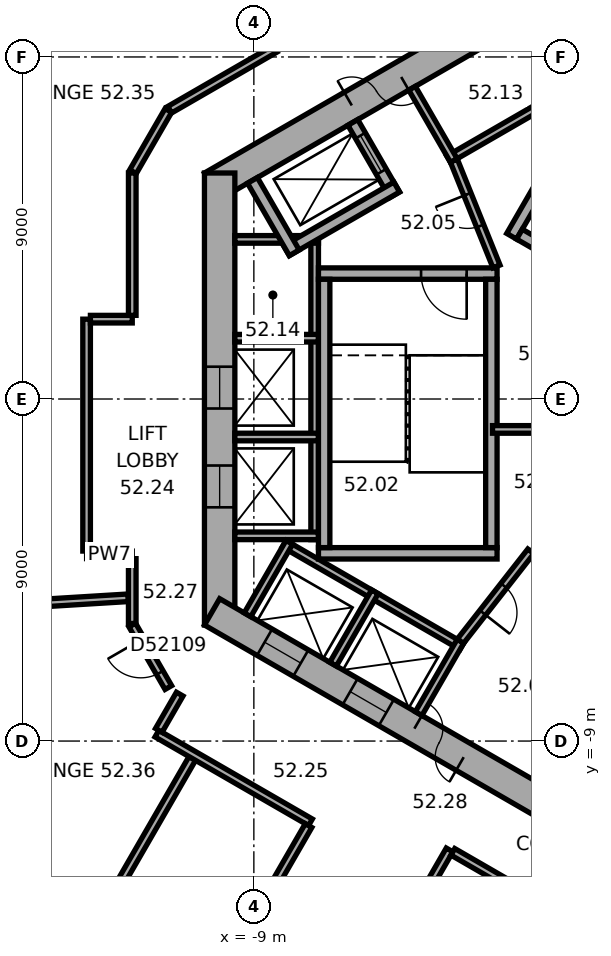
"""IFC4 building model, lengths in metres.
Left out: names, types, materials, properties, quantities, classifications, styles, units other than length and angle.
Written with IfcOpenShell. Run it as: python <this file> out.ifc"""

import sys

from ifc_helpers import new_model, si_unit, direction, frame, frame_2d, origin, place, context, subcontext, project, spatial, rectangle, extrude, element, fill, save


model = new_model("IFC4")
c1 = context("Model", 3, precision=1e-05, world=origin(), true_north=direction((0.0, 1.0)))
c2 = subcontext(c1, "Body", "Model", "MODEL_VIEW")
j1 = project(units=[si_unit("LENGTHUNIT", "METRE"), si_unit("PLANEANGLEUNIT", "RADIAN")], contexts=[c1])
p1 = place(None, origin())
s1 = spatial("IfcSite", under=j1, at=p1, CompositionType="ELEMENT")
p2 = place(p1, origin())
s2 = spatial("IfcBuilding", under=s1, at=p2, CompositionType="ELEMENT")
p3 = place(p2, frame((0.0, 0.0, 210.6)))
s3 = spatial("IfcBuildingStorey", under=s2, at=p3, CompositionType="ELEMENT", Elevation=210.6)
p4 = place(p3, frame((0.2, 11.547, 0.0), z_axis=(0.0, 0.0, 1.0), x_axis=(-0.866023897231, -0.500002609418, 0.0)))
e1 = element("IfcWall", 1, at=p4, inside=s3, PredefinedType="SHEAR", context=c2, shape_type="SweptSolid", body=[
    extrude(rectangle(XDim=11.894, YDim=0.8, at=frame_2d((5.947, 0.0))), origin(), (0.0, 0.0, 1.0), 3.7),
])
p5 = place(p4, frame((6.147, 0.0, 0.0)))
e2 = element("IfcOpeningElement", 2, at=p5, cuts=e1, PredefinedType="OPENING", context=c2, shape_type="SweptSolid", body=[
    extrude(rectangle(XDim=1.5, YDim=2.1, at=frame_2d((0.75, 1.05))), frame((0.0, 0.41, 0.0), z_axis=(0.0, -1.0, 0.0), x_axis=(1.0, 0.0, 0.0)), (0.0, 0.0, 1.0), 0.82),
])
p6 = place(p4, frame((2.997, 0.0, 0.0)))
e3 = element("IfcOpeningElement", 3, at=p6, cuts=e1, PredefinedType="OPENING", context=c2, shape_type="SweptSolid", body=[
    extrude(rectangle(XDim=0.9, YDim=2.1, at=frame_2d((0.45, 1.05))), frame((0.0, 0.41, 0.0), z_axis=(0.0, -1.0, 0.0), x_axis=(1.0, 0.0, 0.0)), (0.0, 0.0, 1.0), 0.82),
])
p7 = place(p3, frame((-9.9, 5.947, 0.0), z_axis=(0.0, 0.0, 1.0), x_axis=(0.0, -1.0, 0.0)))
e4 = element("IfcWall", 4, at=p7, inside=s3, PredefinedType="SHEAR", context=c2, shape_type="SweptSolid", body=[
    extrude(rectangle(XDim=11.894, YDim=0.8, at=frame_2d((5.947, 0.0))), origin(), (0.0, 0.0, 1.0), 3.7),
])
p8 = place(p7, frame((5.097, 0.0, 0.0)))
e5 = element("IfcOpeningElement", 5, at=p8, cuts=e4, PredefinedType="OPENING", context=c2, shape_type="SweptSolid", body=[
    extrude(rectangle(XDim=1.1, YDim=2.1, at=frame_2d((0.55, 1.05))), frame((0.0, 0.41, 0.0), z_axis=(0.0, -1.0, 0.0), x_axis=(1.0, 0.0, 0.0)), (0.0, 0.0, 1.0), 0.82),
])
p9 = place(p7, frame((7.697, 0.0, 0.0)))
e6 = element("IfcOpeningElement", 6, at=p9, cuts=e4, PredefinedType="OPENING", context=c2, shape_type="SweptSolid", body=[
    extrude(rectangle(XDim=1.1, YDim=2.1, at=frame_2d((0.55, 1.05))), frame((0.0, 0.41, 0.0), z_axis=(0.0, -1.0, 0.0), x_axis=(1.0, 0.0, 0.0)), (0.0, 0.0, 1.0), 0.82),
])
p10 = place(p3, frame((-10.1, -5.6, 0.0), z_axis=(0.0, 0.0, 1.0), x_axis=(0.866023897231, -0.500002609418, 0.0)))
e7 = element("IfcWall", 7, at=p10, inside=s3, PredefinedType="SHEAR", context=c2, shape_type="SweptSolid", body=[
    extrude(rectangle(XDim=11.894, YDim=0.8, at=frame_2d((5.947, 0.0))), origin(), (0.0, 0.0, 1.0), 3.7),
])
p11 = place(p10, frame((6.147, 0.0, 0.0)))
e8 = element("IfcOpeningElement", 8, at=p11, cuts=e7, PredefinedType="OPENING", context=c2, shape_type="SweptSolid", body=[
    extrude(rectangle(XDim=1.5, YDim=2.1, at=frame_2d((0.75, 1.05))), frame((0.0, 0.41, 0.0), z_axis=(0.0, -1.0, 0.0), x_axis=(1.0, 0.0, 0.0)), (0.0, 0.0, 1.0), 0.82),
])
p12 = place(p10, frame((1.597, 0.0, 0.0)))
e9 = element("IfcOpeningElement", 9, at=p12, cuts=e7, PredefinedType="OPENING", context=c2, shape_type="SweptSolid", body=[
    extrude(rectangle(XDim=1.1, YDim=2.1, at=frame_2d((0.55, 1.05))), frame((0.0, 0.41, 0.0), z_axis=(0.0, -1.0, 0.0), x_axis=(1.0, 0.0, 0.0)), (0.0, 0.0, 1.0), 0.82),
])
p13 = place(p10, frame((4.197, 0.0, 0.0)))
e10 = element("IfcOpeningElement", 10, at=p13, cuts=e7, PredefinedType="OPENING", context=c2, shape_type="SweptSolid", body=[
    extrude(rectangle(XDim=1.1, YDim=2.1, at=frame_2d((0.55, 1.05))), frame((0.0, 0.41, 0.0), z_axis=(0.0, -1.0, 0.0), x_axis=(1.0, 0.0, 0.0)), (0.0, 0.0, 1.0), 0.82),
])
p14 = place(p3, frame((0.803, 9.009, 0.0), z_axis=(0.0, 0.0, 1.0), x_axis=(-0.866028230842, -0.499995103361, 0.0)))
e11 = element("IfcWall", 11, at=p14, inside=s3, PredefinedType="PARTITIONING", context=c2, shape_type="SweptSolid", body=[
    extrude(rectangle(XDim=5.4, YDim=0.2, at=frame_2d((2.7, 0.0))), origin(), (0.0, 0.0, 1.0), 3.35),
])
p15 = place(p3, frame((-3.737, 6.272, 0.0), z_axis=(0.0, 0.0, 1.0), x_axis=(-0.50002983664, 0.866008176907, 0.0)))
e12 = element("IfcWall", 12, at=p15, inside=s3, PredefinedType="PARTITIONING", context=c2, shape_type="SweptSolid", body=[
    extrude(rectangle(XDim=2.2, YDim=0.2, at=frame_2d((1.1, 0.0))), origin(), (0.0, 0.0, 1.0), 3.35),
])
p16 = place(p3, frame((-7.4, 4.3, 0.0), z_axis=(0.0, 0.0, 1.0), x_axis=(0.0, -1.0, 0.0)))
e13 = element("IfcWall", 13, at=p16, inside=s3, PredefinedType="PARTITIONING", context=c2, shape_type="SweptSolid", body=[
    extrude(rectangle(XDim=8.0, YDim=0.2, at=frame_2d((4.0, 0.0))), origin(), (0.0, 0.0, 1.0), 3.35),
])
for number, where, z_axis, x_axis in (
    (14, (-7.3, 4.2, 0.0), (0.0, 0.0, 1.0), (-1.0, 0.0, 0.0)),
    (15, (-7.3, 1.6, 0.0), (0.0, 0.0, 1.0), (-1.0, 0.0, 0.0)),
    (16, (-7.3, -1.0, 0.0), (0.0, 0.0, 1.0), (-1.0, 0.0, 0.0)),
    (17, (-7.3, -3.6, 0.0), (0.0, 0.0, 1.0), (-1.0, 0.0, 0.0)),
):
    element("IfcWall", number, at=place(p3, frame(where, z_axis=z_axis, x_axis=x_axis)), inside=s3, PredefinedType="PARTITIONING", context=c2, shape_type="SweptSolid", body=[
        extrude(rectangle(XDim=2.2, YDim=0.2, at=frame_2d((1.1, 0.0))), origin(), (0.0, 0.0, 1.0), 3.35),
    ])
p17 = place(p3, frame((-8.203, -3.809, 0.0), z_axis=(0.0, 0.0, 1.0), x_axis=(0.866028230842, -0.499995103361, 0.0)))
e18 = element("IfcWall", 18, at=p17, inside=s3, PredefinedType="PARTITIONING", context=c2, shape_type="SweptSolid", body=[
    extrude(rectangle(XDim=5.4, YDim=0.2, at=frame_2d((2.7, 0.0))), origin(), (0.0, 0.0, 1.0), 3.35),
])
for number, where, z_axis, x_axis in (
    (19, (-8.067, -3.772, 0.0), (0.0, 0.0, 1.0), (-0.5, -0.866, 0.0)),
    (20, (-5.815, -5.072, 0.0), (0.0, 0.0, 1.0), (-0.5, -0.866, 0.0)),
):
    element("IfcWall", number, at=place(p3, frame(where, z_axis=z_axis, x_axis=x_axis)), inside=s3, PredefinedType="PARTITIONING", context=c2, shape_type="SweptSolid", body=[
        extrude(rectangle(XDim=2.2, YDim=0.2, at=frame_2d((1.1, 0.0))), origin(), (0.0, 0.0, 1.0), 3.35),
    ])
p18 = place(p3, frame((-3.563, -6.372, 0.0), z_axis=(0.0, 0.0, 1.0), x_axis=(-0.499994660107, -0.866028486751, 0.0)))
e21 = element("IfcWall", 21, at=p18, inside=s3, PredefinedType="PARTITIONING", context=c2, shape_type="SweptSolid", body=[
    extrude(rectangle(XDim=2.2, YDim=0.2, at=frame_2d((1.1, 0.0))), origin(), (0.0, 0.0, 1.0), 3.35),
])
p19 = place(p3, frame((-2.216, 4.282, 0.0), z_axis=(0.0, 0.0, 1.0), x_axis=(0.499977259774, 0.866038532462, 0.0)))
e22 = element("IfcWall", 22, at=p19, inside=s3, PredefinedType="SHEAR", context=c2, shape_type="SweptSolid", body=[
    extrude(rectangle(XDim=4.7, YDim=0.3, at=frame_2d((2.35, 0.0))), origin(), (0.0, 0.0, 1.0), 3.35),
])
p20 = place(p3, frame((4.103, 0.807, 0.0), z_axis=(0.0, 0.0, 1.0), x_axis=(-0.866027801685, 0.499995846692, 0.0)))
e23 = element("IfcWall", 23, at=p20, inside=s3, PredefinedType="SHEAR", context=c2, shape_type="SweptSolid", body=[
    extrude(rectangle(XDim=7.06, YDim=0.3, at=frame_2d((3.53, 0.0))), origin(), (0.0, 0.0, 1.0), 3.35),
])
p21 = place(p3, frame((-2.6, 3.3, 0.0), z_axis=(0.0, 0.0, 1.0), x_axis=(-1.0, 0.0, 0.0)))
e24 = element("IfcWall", 24, at=p21, inside=s3, PredefinedType="SHEAR", context=c2, shape_type="SweptSolid", body=[
    extrude(rectangle(XDim=4.7, YDim=0.3, at=frame_2d((2.35, 0.0))), origin(), (0.0, 0.0, 1.0), 3.35),
])
p22 = place(p21, frame((0.8, 0.0, 0.0)))
e25 = element("IfcOpeningElement", 25, at=p22, cuts=e24, PredefinedType="OPENING", context=c2, shape_type="SweptSolid", body=[
    extrude(rectangle(XDim=1.2, YDim=2.1, at=frame_2d((0.6, 1.05))), frame((0.0, 0.16, 0.0), z_axis=(0.0, -1.0, 0.0), x_axis=(1.0, 0.0, 0.0)), (0.0, 0.0, 1.0), 0.32),
])
p23 = place(p3, frame((-2.6, -4.06, 0.0), z_axis=(0.0, 0.0, 1.0), x_axis=(-1.0, 0.0, 0.0)))
e26 = element("IfcWall", 26, at=p23, inside=s3, PredefinedType="SHEAR", context=c2, shape_type="SweptSolid", body=[
    extrude(rectangle(XDim=4.7, YDim=0.3, at=frame_2d((2.35, 0.0))), origin(), (0.0, 0.0, 1.0), 3.35),
])
for number, where, z_axis, x_axis in (
    (27, (-2.75, 3.15, 0.0), (0.0, 0.0, 1.0), (0.0, -1.0, 0.0)),
    (28, (-7.15, 3.15, 0.0), (0.0, 0.0, 1.0), (0.0, -1.0, 0.0)),
):
    element("IfcWall", number, at=place(p3, frame(where, z_axis=z_axis, x_axis=x_axis)), inside=s3, PredefinedType="SHEAR", context=c2, shape_type="SweptSolid", body=[
        extrude(rectangle(XDim=7.06, YDim=0.3, at=frame_2d((3.53, 0.0))), origin(), (0.0, 0.0, 1.0), 3.35),
    ])
p24 = place(p3, frame((-5.295, 5.372, 0.0), z_axis=(0.0, 0.0, 1.0), x_axis=(-0.500077893725, 0.86598042715, 0.0)))
e29 = element("IfcWall", 29, at=p24, inside=s3, PredefinedType="SHEAR", context=c2, shape_type="SweptSolid", body=[
    extrude(rectangle(XDim=2.2, YDim=0.3, at=frame_2d((1.1, 0.0))), origin(), (0.0, 0.0, 1.0), 3.35),
])
p25 = place(p24, frame((0.7, 0.0, 0.0)))
e30 = element("IfcOpeningElement", 30, at=p25, cuts=e29, PredefinedType="OPENING", context=c2, shape_type="SweptSolid", body=[
    extrude(rectangle(XDim=1.1, YDim=2.1, at=frame_2d((0.55, 1.05))), frame((0.0, 0.16, 0.0), z_axis=(0.0, -1.0, 0.0), x_axis=(1.0, 0.0, 0.0)), (0.0, 0.0, 1.0), 0.32),
])
p26 = place(p3, frame((-5.24, 5.577, 0.0), z_axis=(0.0, 0.0, 1.0), x_axis=(-0.866014461049, -0.500018952895, 0.0)))
e31 = element("IfcWall", 31, at=p26, inside=s3, PredefinedType="SHEAR", context=c2, shape_type="SweptSolid", body=[
    extrude(rectangle(XDim=3.35, YDim=0.3, at=frame_2d((1.675, 0.0))), origin(), (0.0, 0.0, 1.0), 3.35),
])
p27 = place(p3, frame((-7.937, 3.847, 0.0), z_axis=(0.0, 0.0, 1.0), x_axis=(-0.50002983664, 0.866008176907, 0.0)))
e32 = element("IfcWall", 32, at=p27, inside=s3, PredefinedType="SHEAR", context=c2, shape_type="SweptSolid", body=[
    extrude(rectangle(XDim=2.2, YDim=0.3, at=frame_2d((1.1, 0.0))), origin(), (0.0, 0.0, 1.0), 3.35),
])
p28 = place(p3, frame((-2.615, 3.487, 0.0), z_axis=(0.0, 0.0, 1.0), x_axis=(-0.373576831041, 0.92759924068, 0.0)))
e33 = element("IfcWall", 33, at=p28, inside=s3, PredefinedType="PARTITIONING", context=c2, shape_type="SweptSolid", body=[
    extrude(rectangle(XDim=3.002, YDim=0.2, at=frame_2d((1.501, 0.0))), origin(), (0.0, 0.0, 1.0), 3.35),
])
p29 = place(p28, frame((1.15, 0.0, 0.0)))
e34 = element("IfcOpeningElement", 34, at=p29, cuts=e33, PredefinedType="OPENING", context=c2, shape_type="SweptSolid", body=[
    extrude(rectangle(XDim=0.9, YDim=2.1, at=frame_2d((0.45, 1.05))), frame((0.0, 0.11, 0.0), z_axis=(0.0, -1.0, 0.0), x_axis=(1.0, 0.0, 0.0)), (0.0, 0.0, 1.0), 0.22),
])
p30 = place(p3, frame((-1.712, -4.008, 0.0), z_axis=(0.0, 0.0, 1.0), x_axis=(-0.616549420702, -0.787316208287, 0.0)))
e35 = element("IfcWall", 35, at=p30, inside=s3, PredefinedType="PARTITIONING", context=c2, shape_type="SweptSolid", body=[
    extrude(rectangle(XDim=3.002, YDim=0.2, at=frame_2d((1.501, 0.0))), origin(), (0.0, 0.0, 1.0), 3.35),
])
p31 = place(p30, frame((1.15, 0.0, 0.0)))
e36 = element("IfcOpeningElement", 36, at=p31, cuts=e35, PredefinedType="OPENING", context=c2, shape_type="SweptSolid", body=[
    extrude(rectangle(XDim=0.9, YDim=2.1, at=frame_2d((0.45, 1.05))), frame((0.0, 0.11, 0.0), z_axis=(0.0, -1.0, 0.0), x_axis=(1.0, 0.0, 0.0)), (0.0, 0.0, 1.0), 0.22),
])
p32 = place(p3, frame((0.92, -0.8, 0.0), z_axis=(0.0, 0.0, 1.0), x_axis=(-1.0, 0.0, 0.0)))
e37 = element("IfcWall", 37, at=p32, inside=s3, PredefinedType="PARTITIONING", context=c2, shape_type="SweptSolid", body=[
    extrude(rectangle(XDim=3.64, YDim=0.2, at=frame_2d((1.82, 0.0))), origin(), (0.0, 0.0, 1.0), 3.35),
])
p33 = place(p3, frame((-19.241, -5.654, 0.0), z_axis=(0.0, 0.0, 1.0), x_axis=(0.998135538818, 0.061036432963, 0.0)))
e38 = element("IfcWall", 38, at=p33, inside=s3, PredefinedType="PARTITIONING", context=c2, shape_type="SweptSolid", body=[
    extrude(rectangle(XDim=6.944, YDim=0.2, at=frame_2d((3.472, 0.0))), origin(), (0.0, 0.0, 1.0), 2.65),
])
p34 = place(p3, frame((-13.646, -14.696, 0.0), z_axis=(0.0, 0.0, 1.0), x_axis=(0.500006596359, 0.866021595341, 0.0)))
e39 = element("IfcWall", 39, at=p34, inside=s3, PredefinedType="PARTITIONING", context=c2, shape_type="SweptSolid", body=[
    extrude(rectangle(XDim=6.049, YDim=0.2, at=frame_2d((3.025, 0.0))), origin(), (0.0, 0.0, 1.0), 3.35),
])
p35 = place(p3, frame((-13.401, -4.101, 0.0), z_axis=(0.0, 0.0, 1.0), x_axis=(1.0, 0.0, 0.0)))
e40 = element("IfcWall", 40, at=p35, inside=s3, PredefinedType="PARTITIONING", context=c2, shape_type="SweptSolid", body=[
    extrude(rectangle(XDim=1.201, YDim=0.2, at=frame_2d((0.601, 0.0))), origin(), (0.0, 0.0, 1.0), 3.35),
])
p36 = place(p3, frame((-13.401, 2.101, 0.0), z_axis=(0.0, 0.0, 1.0), x_axis=(0.0, -1.0, 0.0)))
e41 = element("IfcWall", 41, at=p36, inside=s3, PredefinedType="PARTITIONING", context=c2, shape_type="SweptSolid", body=[
    extrude(rectangle(XDim=6.102, YDim=0.2, at=frame_2d((3.051, 0.0))), origin(), (0.0, 0.0, 1.0), 3.35),
])
p37 = place(p3, frame((-12.2, -5.947, 0.0), z_axis=(0.0, 0.0, 1.0), x_axis=(0.500022797313, -0.86601224135, 0.0)))
e42 = element("IfcWall", 42, at=p37, inside=s3, PredefinedType="PARTITIONING", context=c2, shape_type="SweptSolid", body=[
    extrude(rectangle(XDim=1.9, YDim=0.2, at=frame_2d((0.95, 0.0))), origin(), (0.0, 0.0, 1.0), 3.35),
])
p38 = place(p37, frame((0.45, 0.0, 0.0)))
e43 = element("IfcOpeningElement", 43, at=p38, cuts=e42, PredefinedType="OPENING", context=c2, shape_type="SweptSolid", body=[
    extrude(rectangle(XDim=1.0, YDim=2.1, at=frame_2d((0.5, 1.05))), frame((0.0, 0.11, 0.0), z_axis=(0.0, -1.0, 0.0), x_axis=(1.0, 0.0, 0.0)), (0.0, 0.0, 1.0), 0.22),
])
p39 = place(p3, frame((-12.2, -4.201, 0.0), z_axis=(0.0, 0.0, 1.0), x_axis=(0.0, -1.0, 0.0)))
e44 = element("IfcWall", 44, at=p39, inside=s3, PredefinedType="PARTITIONING", context=c2, shape_type="SweptSolid", body=[
    extrude(rectangle(XDim=1.706, YDim=0.2, at=frame_2d((0.853, 0.0))), origin(), (0.0, 0.0, 1.0), 3.35),
])
p40 = place(p3, frame((-12.2, 2.101, 0.0), z_axis=(0.0, 0.0, 1.0), x_axis=(-1.0, 0.0, 0.0)))
e45 = element("IfcWall", 45, at=p40, inside=s3, PredefinedType="PARTITIONING", context=c2, shape_type="SweptSolid", body=[
    extrude(rectangle(XDim=1.101, YDim=0.2, at=frame_2d((0.551, 0.0))), origin(), (0.0, 0.0, 1.0), 3.35),
])
p41 = place(p3, frame((-12.2, 5.947, 0.0), z_axis=(0.0, 0.0, 1.0), x_axis=(0.0, -1.0, 0.0)))
e46 = element("IfcWall", 46, at=p41, inside=s3, PredefinedType="PARTITIONING", context=c2, shape_type="SweptSolid", body=[
    extrude(rectangle(XDim=3.746, YDim=0.2, at=frame_2d((1.873, 0.0))), origin(), (0.0, 0.0, 1.0), 3.35),
])
p42 = place(p3, frame((-11.551, -8.805, 0.0), z_axis=(0.0, 0.0, 1.0), x_axis=(0.866038310922, -0.499977643516, 0.0)))
e47 = element("IfcWall", 47, at=p42, inside=s3, PredefinedType="PARTITIONING", context=c2, shape_type="SweptSolid", body=[
    extrude(rectangle(XDim=4.665, YDim=0.2, at=frame_2d((2.333, 0.0))), origin(), (0.0, 0.0, 1.0), 3.35),
])
p43 = place(p3, frame((-11.25, 7.592, 0.0), z_axis=(0.0, 0.0, 1.0), x_axis=(-0.499964847546, -0.866045698112, 0.0)))
e48 = element("IfcWall", 48, at=p43, inside=s3, PredefinedType="PARTITIONING", context=c2, shape_type="SweptSolid", body=[
    extrude(rectangle(XDim=1.86, YDim=0.2, at=frame_2d((0.93, 0.0))), origin(), (0.0, 0.0, 1.0), 3.35),
])
p44 = place(p3, frame((-10.951, -7.765, 0.0), z_axis=(0.0, 0.0, 1.0), x_axis=(-0.499978356969, -0.866037899034, 0.0)))
e49 = element("IfcWall", 49, at=p44, inside=s3, PredefinedType="PARTITIONING", context=c2, shape_type="SweptSolid", body=[
    extrude(rectangle(XDim=1.101, YDim=0.2, at=frame_2d((0.551, 0.0))), origin(), (0.0, 0.0, 1.0), 3.35),
])
p45 = place(p3, frame((-10.585, -16.463, 0.0), z_axis=(0.0, 0.0, 1.0), x_axis=(0.499993802756, 0.866028981735, 0.0)))
e50 = element("IfcWall", 50, at=p45, inside=s3, PredefinedType="PARTITIONING", context=c2, shape_type="SweptSolid", body=[
    extrude(rectangle(XDim=6.049, YDim=0.2, at=frame_2d((3.024, 0.0))), origin(), (0.0, 0.0, 1.0), 2.65),
])
p46 = place(p45, frame((2.524, 0.0, 0.0)))
e51 = element("IfcOpeningElement", 51, at=p46, cuts=e50, PredefinedType="OPENING", context=c2, shape_type="SweptSolid", body=[
    extrude(rectangle(XDim=1.0, YDim=2.1, at=frame_2d((0.5, 1.05))), frame((0.0, 0.11, 0.0), z_axis=(0.0, -1.0, 0.0), x_axis=(1.0, 0.0, 0.0)), (0.0, 0.0, 1.0), 0.22),
])
p47 = place(p3, frame((-8.437, 9.217, 0.0), z_axis=(0.0, 0.0, 1.0), x_axis=(-0.866005660673, -0.500034194513, 0.0)))
e52 = element("IfcWall", 52, at=p47, inside=s3, PredefinedType="PARTITIONING", context=c2, shape_type="SweptSolid", body=[
    extrude(rectangle(XDim=3.209, YDim=0.2, at=frame_2d((1.604, 0.0))), origin(), (0.0, 0.0, 1.0), 3.35),
])
p48 = place(p3, frame((-7.525, -18.23, 0.0), z_axis=(0.0, 0.0, 1.0), x_axis=(0.499983153418, 0.866035129944, 0.0)))
e53 = element("IfcWall", 53, at=p48, inside=s3, PredefinedType="PARTITIONING", context=c2, shape_type="SweptSolid", body=[
    extrude(rectangle(XDim=7.35, YDim=0.2, at=frame_2d((3.675, 0.0))), origin(), (0.0, 0.0, 1.0), 3.35),
])
p49 = place(p48, frame((3.175, 0.0, 0.0)))
e54 = element("IfcOpeningElement", 54, at=p49, cuts=e53, PredefinedType="OPENING", context=c2, shape_type="SweptSolid", body=[
    extrude(rectangle(XDim=1.0, YDim=2.1, at=frame_2d((0.5, 1.05))), frame((0.0, 0.11, 0.0), z_axis=(0.0, -1.0, 0.0), x_axis=(1.0, 0.0, 0.0)), (0.0, 0.0, 1.0), 0.22),
])
p50 = place(p3, frame((-3.763, -11.915, 0.0), z_axis=(0.0, 0.0, 1.0), x_axis=(0.866037915695, -0.499978328108, 0.0)))
e55 = element("IfcWall", 55, at=p50, inside=s3, PredefinedType="PARTITIONING", context=c2, shape_type="SweptSolid", body=[
    extrude(rectangle(XDim=3.249, YDim=0.2, at=frame_2d((1.625, 0.0))), origin(), (0.0, 0.0, 1.0), 3.35),
])
p51 = place(p5, origin())
e56 = element("IfcDoor", 56, at=p51, inside=s3, OperationType="DOUBLE_DOOR_SINGLE_SWING", PredefinedType="DOOR", context=c2, shape_type="SweptSolid", body=[
    extrude(rectangle(XDim=1.5, YDim=2.1, at=frame_2d((0.75, 1.05))), frame((0.0, 0.025, 0.0), z_axis=(0.0, -1.0, 0.0), x_axis=(1.0, 0.0, 0.0)), (0.0, 0.0, 1.0), 0.05),
])
fill(e2, e56)
p52 = place(p11, origin())
e57 = element("IfcDoor", 57, at=p52, inside=s3, OperationType="DOUBLE_DOOR_SINGLE_SWING", PredefinedType="DOOR", context=c2, shape_type="SweptSolid", body=[
    extrude(rectangle(XDim=1.5, YDim=2.1, at=frame_2d((0.75, 1.05))), frame((0.0, 0.025, 0.0), z_axis=(0.0, -1.0, 0.0), x_axis=(1.0, 0.0, 0.0)), (0.0, 0.0, 1.0), 0.05),
])
fill(e8, e57)
p53 = place(p22, origin())
e58 = element("IfcDoor", 58, at=p53, inside=s3, OperationType="SINGLE_SWING_RIGHT", PredefinedType="DOOR", context=c2, shape_type="SweptSolid", body=[
    extrude(rectangle(XDim=1.2, YDim=2.1, at=frame_2d((0.6, 1.05))), frame((0.0, 0.025, 0.0), z_axis=(0.0, -1.0, 0.0), x_axis=(1.0, 0.0, 0.0)), (0.0, 0.0, 1.0), 0.05),
])
fill(e25, e58)
p54 = place(p29, origin())
e59 = element("IfcDoor", 59, at=p54, inside=s3, OperationType="SINGLE_SWING_LEFT", PredefinedType="DOOR", context=c2, shape_type="SweptSolid", body=[
    extrude(rectangle(XDim=0.9, YDim=2.1, at=frame_2d((0.45, 1.05))), frame((0.0, 0.025, 0.0), z_axis=(0.0, -1.0, 0.0), x_axis=(1.0, 0.0, 0.0)), (0.0, 0.0, 1.0), 0.05),
])
fill(e34, e59)
p55 = place(p31, origin())
e60 = element("IfcDoor", 60, at=p55, inside=s3, OperationType="SINGLE_SWING_LEFT", PredefinedType="DOOR", context=c2, shape_type="SweptSolid", body=[
    extrude(rectangle(XDim=0.9, YDim=2.1, at=frame_2d((0.45, 1.05))), frame((0.0, 0.025, 0.0), z_axis=(0.0, -1.0, 0.0), x_axis=(1.0, 0.0, 0.0)), (0.0, 0.0, 1.0), 0.05),
])
fill(e36, e60)
p56 = place(p25, origin())
e61 = element("IfcDoor", 61, at=p56, inside=s3, OperationType="DOUBLE_DOOR_SLIDING", PredefinedType="DOOR", context=c2, shape_type="SweptSolid", body=[
    extrude(rectangle(XDim=1.1, YDim=2.1, at=frame_2d((0.55, 1.05))), frame((0.0, 0.025, 0.0), z_axis=(0.0, -1.0, 0.0), x_axis=(1.0, 0.0, 0.0)), (0.0, 0.0, 1.0), 0.05),
])
fill(e30, e61)
p57 = place(p8, origin())
e62 = element("IfcDoor", 62, at=p57, inside=s3, OperationType="DOUBLE_DOOR_SLIDING", PredefinedType="DOOR", context=c2, shape_type="SweptSolid", body=[
    extrude(rectangle(XDim=1.1, YDim=2.1, at=frame_2d((0.55, 1.05))), frame((0.0, 0.025, 0.0), z_axis=(0.0, -1.0, 0.0), x_axis=(1.0, 0.0, 0.0)), (0.0, 0.0, 1.0), 0.05),
])
fill(e5, e62)
p58 = place(p9, origin())
e63 = element("IfcDoor", 63, at=p58, inside=s3, OperationType="DOUBLE_DOOR_SLIDING", PredefinedType="DOOR", context=c2, shape_type="SweptSolid", body=[
    extrude(rectangle(XDim=1.1, YDim=2.1, at=frame_2d((0.55, 1.05))), frame((0.0, 0.025, 0.0), z_axis=(0.0, -1.0, 0.0), x_axis=(1.0, 0.0, 0.0)), (0.0, 0.0, 1.0), 0.05),
])
fill(e6, e63)
p59 = place(p12, origin())
e64 = element("IfcDoor", 64, at=p59, inside=s3, OperationType="DOUBLE_DOOR_SLIDING", PredefinedType="DOOR", context=c2, shape_type="SweptSolid", body=[
    extrude(rectangle(XDim=1.1, YDim=2.1, at=frame_2d((0.55, 1.05))), frame((0.0, 0.025, 0.0), z_axis=(0.0, -1.0, 0.0), x_axis=(1.0, 0.0, 0.0)), (0.0, 0.0, 1.0), 0.05),
])
fill(e9, e64)
p60 = place(p13, origin())
e65 = element("IfcDoor", 65, at=p60, inside=s3, OperationType="DOUBLE_DOOR_SLIDING", PredefinedType="DOOR", context=c2, shape_type="SweptSolid", body=[
    extrude(rectangle(XDim=1.1, YDim=2.1, at=frame_2d((0.55, 1.05))), frame((0.0, 0.025, 0.0), z_axis=(0.0, -1.0, 0.0), x_axis=(1.0, 0.0, 0.0)), (0.0, 0.0, 1.0), 0.05),
])
fill(e10, e65)
p61 = place(p38, origin())
e66 = element("IfcDoor", 66, at=p61, inside=s3, OperationType="SINGLE_SWING_LEFT", PredefinedType="DOOR", context=c2, shape_type="SweptSolid", body=[
    extrude(rectangle(XDim=1.0, YDim=2.1, at=frame_2d((0.5, 1.05))), frame((0.0, 0.025, 0.0), z_axis=(0.0, -1.0, 0.0), x_axis=(1.0, 0.0, 0.0)), (0.0, 0.0, 1.0), 0.05),
])
fill(e43, e66)
save(model, sys.argv[1])
